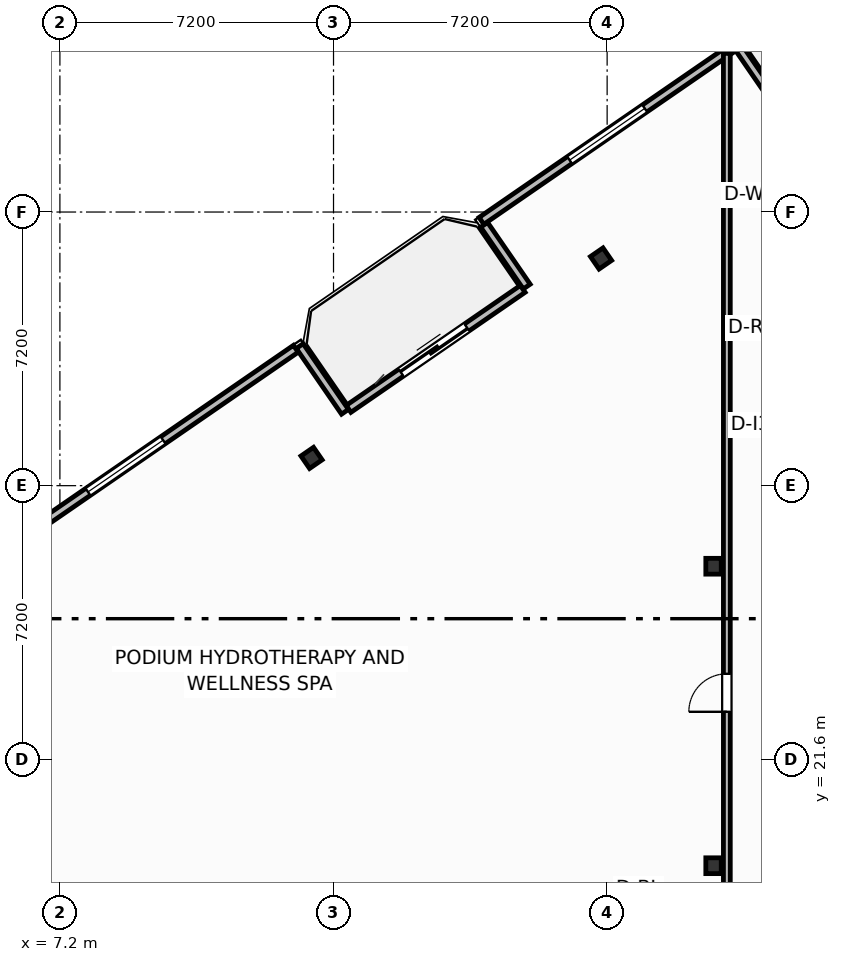
"""IFC4 building model, lengths in metres.
Left out: names, types, materials, properties, quantities, classifications, styles, units other than length and angle.
Written with IfcOpenShell. Run it as: python <this file> out.ifc"""

import sys

from ifc_helpers import new_model, si_unit, direction, frame, frame_2d, origin, origin_2d, place, context, subcontext, project, spatial, rectangle, i_section, extrude, element, fill, save


model = new_model("IFC4")
c1 = context("Model", 3, precision=1e-05, world=origin(), true_north=direction((0.0, 1.0)))
c2 = subcontext(c1, "Body", "Model", "MODEL_VIEW")
j1 = project(units=[si_unit("LENGTHUNIT", "METRE"), si_unit("PLANEANGLEUNIT", "RADIAN")], contexts=[c1])
p1 = place(None, origin())
s1 = spatial("IfcSite", under=j1, at=p1, CompositionType="ELEMENT")
p2 = place(p1, origin())
s2 = spatial("IfcBuilding", under=s1, at=p2, CompositionType="ELEMENT")
p3 = place(p2, frame((0.0, 0.0, 287.8)))
s3 = spatial("IfcBuildingStorey", under=s2, at=p3, CompositionType="ELEMENT", Elevation=287.8)
for number, where, z_axis, x_axis in (
    (1, (24.4, 18.8, 0.0), (0.0, 0.0, 1.0), (1.0, 0.0, 0.0)),
    (2, (24.4, 26.68, 0.0), (0.0, 0.0, 1.0), (1.0, 0.0, 0.0)),
):
    element("IfcColumn", number, at=place(p3, frame(where, z_axis=z_axis, x_axis=x_axis)), inside=s3, PredefinedType="COLUMN", context=c2, shape_type="SweptSolid", body=[
        extrude(i_section(OverallWidth=0.406, OverallDepth=0.416, WebThickness=0.03, FlangeThickness=0.048, FilletRadius=0.025, at=origin_2d()), origin(), (0.0, 0.0, 1.0), 3.7),
    ])
for number, where, z_axis, x_axis in (
    (3, (21.44, 34.778, 0.0), (0.0, 0.0, 1.0), (0.824, 0.567, 0.0)),
    (4, (13.822, 29.53, 0.0), (0.0, 0.0, 1.0), (0.824, 0.567, 0.0)),
):
    element("IfcColumn", number, at=place(p3, frame(where, z_axis=z_axis, x_axis=x_axis)), inside=s3, PredefinedType="COLUMN", context=c2, shape_type="SweptSolid", body=[
        extrude(i_section(OverallWidth=0.401, OverallDepth=0.399, WebThickness=0.025, FlangeThickness=0.04, FilletRadius=0.022, at=origin_2d()), origin(), (0.0, 0.0, 1.0), 3.7),
    ])
p4 = place(p3, frame((14.795, 30.82, 0.0), z_axis=(0.0, 0.0, 1.0), x_axis=(0.823541290762, 0.567256328665, 0.0)))
e5 = element("IfcWall", 5, at=p4, inside=s3, PredefinedType="SOLIDWALL", context=c2, shape_type="SweptSolid", body=[
    extrude(rectangle(XDim=5.567, YDim=0.22, at=frame_2d((2.784, 0.0))), origin(), (0.0, 0.0, 1.0), 2.66),
])
p5 = place(p4, frame((1.68, 0.0, 0.0)))
e6 = element("IfcOpeningElement", 6, at=p5, cuts=e5, PredefinedType="OPENING", context=c2, shape_type="SweptSolid", body=[
    extrude(rectangle(XDim=2.1, YDim=2.3, at=frame_2d((1.05, 1.15))), frame((0.0, 0.12, 0.0), z_axis=(0.0, -1.0, 0.0), x_axis=(1.0, 0.0, 0.0)), (0.0, 0.0, 1.0), 0.24),
])
p6 = place(p3, frame((26.204, 38.667, 0.0), z_axis=(0.0, 0.0, 1.0), x_axis=(-0.567219383419, 0.823566737474, 0.0)))
e7 = element("IfcWall", 7, at=p6, inside=s3, PredefinedType="SOLIDWALL", context=c2, shape_type="SweptSolid", body=[
    extrude(rectangle(XDim=2.1, YDim=0.22, at=frame_2d((1.05, 0.0))), origin(), (0.0, 0.0, 1.0), 2.66),
])
p7 = place(p3, frame((24.91, 40.325, 0.0), z_axis=(0.0, 0.0, 1.0), x_axis=(-0.823521165086, -0.56728554596, 0.0)))
e8 = element("IfcWall", 8, at=p7, inside=s3, PredefinedType="SOLIDWALL", context=c2, shape_type="SweptSolid", body=[
    extrude(rectangle(XDim=8.035, YDim=0.22, at=frame_2d((4.018, 0.0))), origin(), (0.0, 0.0, 1.0), 2.66),
])
p8 = place(p7, frame((2.817, 0.0, 0.8)))
e9 = element("IfcOpeningElement", 9, at=p8, cuts=e8, PredefinedType="OPENING", context=c2, shape_type="SweptSolid", body=[
    extrude(rectangle(XDim=2.4, YDim=1.78, at=frame_2d((1.2, 0.89))), frame((0.0, 0.12, 0.0), z_axis=(0.0, -1.0, 0.0), x_axis=(1.0, 0.0, 0.0)), (0.0, 0.0, 1.0), 0.24),
])
p9 = place(p3, frame((18.364, 35.664, 0.0), z_axis=(0.0, 0.0, 1.0), x_axis=(0.567215821234, -0.823569190865, 0.0)))
e10 = element("IfcWall", 10, at=p9, inside=s3, PredefinedType="SOLIDWALL", context=c2, shape_type="SweptSolid", body=[
    extrude(rectangle(XDim=1.975, YDim=0.22, at=frame_2d((0.988, 0.0))), origin(), (0.0, 0.0, 1.0), 2.66),
])
p10 = place(p3, frame((14.702, 30.744, 0.0), z_axis=(0.0, 0.0, 1.0), x_axis=(-0.567352541689, 0.823475010816, 0.0)))
e11 = element("IfcWall", 11, at=p10, inside=s3, PredefinedType="SOLIDWALL", context=c2, shape_type="SweptSolid", body=[
    extrude(rectangle(XDim=2.1, YDim=0.22, at=frame_2d((1.05, 0.0))), origin(), (0.0, 0.0, 1.0), 2.66),
])
p11 = place(p3, frame((13.408, 32.402, 0.0), z_axis=(0.0, 0.0, 1.0), x_axis=(-0.823527634633, -0.567276154087, 0.0)))
e12 = element("IfcWall", 12, at=p11, inside=s3, PredefinedType="SOLIDWALL", context=c2, shape_type="SweptSolid", body=[
    extrude(rectangle(XDim=10.88, YDim=0.22, at=frame_2d((5.44, 0.0))), origin(), (0.0, 0.0, 1.0), 2.66),
])
p12 = place(p11, frame((4.24, 0.0, 0.8)))
e13 = element("IfcOpeningElement", 13, at=p12, cuts=e12, PredefinedType="OPENING", context=c2, shape_type="SweptSolid", body=[
    extrude(rectangle(XDim=2.4, YDim=1.78, at=frame_2d((1.2, 0.89))), frame((0.0, 0.12, 0.0), z_axis=(0.0, -1.0, 0.0), x_axis=(1.0, 0.0, 0.0)), (0.0, 0.0, 1.0), 0.24),
])
p13 = place(p3, frame((24.75, 16.85, 0.0), z_axis=(0.0, 0.0, 1.0), x_axis=(0.0, 1.0, 0.0)))
e14 = element("IfcWall", 14, at=p13, inside=s3, PredefinedType="PARTITIONING", context=c2, shape_type="SweptSolid", body=[
    extrude(rectangle(XDim=23.325, YDim=0.18, at=frame_2d((11.663, 0.0))), origin(), (0.0, 0.0, 1.0), 3.38),
])
p14 = place(p13, frame((6.0, 0.0, 0.0)))
e15 = element("IfcOpeningElement", 15, at=p14, cuts=e14, PredefinedType="OPENING", context=c2, shape_type="SweptSolid", body=[
    extrude(rectangle(XDim=1.0, YDim=2.05, at=frame_2d((0.5, 1.025))), frame((0.0, 0.1, 0.0), z_axis=(0.0, -1.0, 0.0), x_axis=(1.0, 0.0, 0.0)), (0.0, 0.0, 1.0), 0.2),
])
p15 = place(p5, origin())
e16 = element("IfcDoor", 16, at=p15, inside=s3, OperationType="SLIDING_TO_LEFT", PredefinedType="DOOR", context=c2, shape_type="SweptSolid", body=[
    extrude(rectangle(XDim=2.1, YDim=2.3, at=frame_2d((1.05, 1.15))), frame((0.0, 0.025, 0.0), z_axis=(0.0, -1.0, 0.0), x_axis=(1.0, 0.0, 0.0)), (0.0, 0.0, 1.0), 0.05),
])
fill(e6, e16)
p16 = place(p8, origin())
e17 = element("IfcWindow", 17, at=p16, inside=s3, PartitioningType="SINGLE_PANEL", PredefinedType="WINDOW", context=c2, shape_type="SweptSolid", body=[
    extrude(rectangle(XDim=2.4, YDim=1.78, at=frame_2d((1.2, 0.89))), frame((0.0, 0.03, 0.0), z_axis=(0.0, -1.0, 0.0), x_axis=(1.0, 0.0, 0.0)), (0.0, 0.0, 1.0), 0.06),
])
fill(e9, e17)
p17 = place(p12, origin())
e18 = element("IfcWindow", 18, at=p17, inside=s3, PartitioningType="SINGLE_PANEL", PredefinedType="WINDOW", context=c2, shape_type="SweptSolid", body=[
    extrude(rectangle(XDim=2.4, YDim=1.78, at=frame_2d((1.2, 0.89))), frame((0.0, 0.03, 0.0), z_axis=(0.0, -1.0, 0.0), x_axis=(1.0, 0.0, 0.0)), (0.0, 0.0, 1.0), 0.06),
])
fill(e13, e18)
p18 = place(p14, origin())
e19 = element("IfcDoor", 19, at=p18, inside=s3, OperationType="SINGLE_SWING_LEFT", PredefinedType="DOOR", context=c2, shape_type="SweptSolid", body=[
    extrude(rectangle(XDim=1.0, YDim=2.05, at=frame_2d((0.5, 1.025))), frame((0.0, 0.025, 0.0), z_axis=(0.0, -1.0, 0.0), x_axis=(1.0, 0.0, 0.0)), (0.0, 0.0, 1.0), 0.05),
])
fill(e15, e19)
save(model, sys.argv[1])
